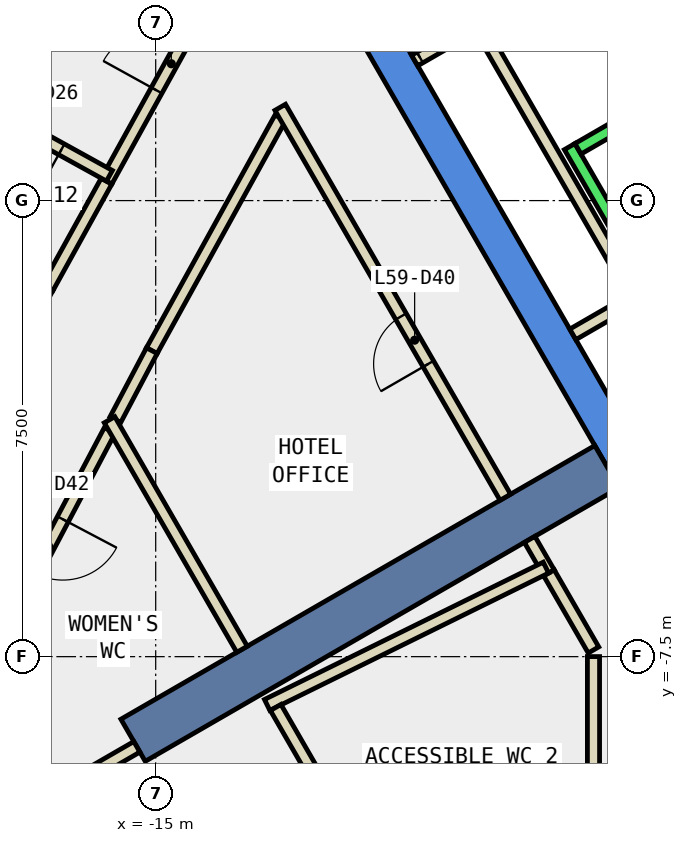
"""IFC4 building model, lengths in metres.
Left out: names, types, materials, properties, quantities, classifications, styles, units other than length and angle.
Written with IfcOpenShell. Run it as: python <this file> out.ifc"""

import sys

from ifc_helpers import new_model, si_unit, direction, frame, frame_2d, origin, place, context, subcontext, project, spatial, polyline, rectangle, outline, extrude, element, fill, save


model = new_model("IFC4")
c1 = context("Model", 3, precision=1e-05, world=origin(), true_north=direction((0.0, 1.0)))
c2 = subcontext(c1, "Body", "Model", "MODEL_VIEW")
j1 = project(units=[si_unit("LENGTHUNIT", "METRE"), si_unit("PLANEANGLEUNIT", "RADIAN")], contexts=[c1])
p1 = place(None, origin())
s1 = spatial("IfcSite", under=j1, at=p1, CompositionType="ELEMENT")
p2 = place(p1, origin())
s2 = spatial("IfcBuilding", under=s1, at=p2, CompositionType="ELEMENT")
p3 = place(p2, frame((0.0, 0.0, 259.4)))
s3 = spatial("IfcBuildingStorey", under=s2, at=p3, CompositionType="ELEMENT", Elevation=259.4)
p4 = place(p3, frame((0.0, 0.0, -0.34)))
e1 = element("IfcWall", 1, at=p4, inside=s3, PredefinedType="SHEAR", context=c2, shape_type="SweptSolid", body=[
    extrude(outline(polyline([(-11.547, 2.5), (-5.774, -7.5), (-5.427, -6.9), (-10.854, 2.5), (-11.547, 2.5)])), origin(), (0.0, 0.0, 1.0), 3.6),
])
p5 = place(p3, frame((-7.578, -4.375, -0.34), z_axis=(0.0, 0.0, 1.0), x_axis=(-0.866024315419, -0.5000018851, 0.0)))
e2 = element("IfcWall", 2, at=p5, inside=s3, PredefinedType="SHEAR", context=c2, shape_type="SweptSolid", body=[
    extrude(rectangle(XDim=9.0, YDim=0.8, at=frame_2d((4.5, 0.0))), origin(), (0.0, 0.0, 1.0), 3.6),
])
p6 = place(p3, frame((-8.532, -6.123, 0.0), z_axis=(0.0, 0.0, 1.0), x_axis=(-0.499977104415, 0.866038622153, 0.0)))
e3 = element("IfcWall", 3, at=p6, inside=s3, PredefinedType="PARTITIONING", context=c2, shape_type="SweptSolid", body=[
    extrude(rectangle(XDim=0.636, YDim=0.2, at=frame_2d((0.318, 0.0))), origin(), (0.0, 0.0, 1.0), 3.26),
])
p7 = place(p3, frame((-12.95, 1.36, 0.0), z_axis=(0.0, 0.0, 1.0), x_axis=(-0.483418231124, -0.875389521194, 0.0)))
e4 = element("IfcWall", 4, at=p7, inside=s3, PredefinedType="PARTITIONING", context=c2, shape_type="SweptSolid", body=[
    extrude(rectangle(XDim=4.373, YDim=0.2, at=frame_2d((2.187, 0.0))), origin(), (0.0, 0.0, 1.0), 3.26),
])
p8 = place(p3, frame((-15.064, -2.468, 0.0), z_axis=(0.0, 0.0, 1.0), x_axis=(-0.467126648849, -0.884190417238, 0.0)))
e5 = element("IfcWall", 5, at=p8, inside=s3, PredefinedType="PARTITIONING", context=c2, shape_type="SweptSolid", body=[
    extrude(rectangle(XDim=1.282, YDim=0.2, at=frame_2d((0.641, 0.0))), origin(), (0.0, 0.0, 1.0), 3.26),
])
p9 = place(p3, frame((-7.8, -7.39, 0.0), z_axis=(0.0, 0.0, 1.0), x_axis=(-0.500266477503, 0.865871498253, 0.0)))
e6 = element("IfcWall", 6, at=p9, inside=s3, PredefinedType="PARTITIONING", context=c2, shape_type="SweptSolid", body=[
    extrude(rectangle(XDim=1.463, YDim=0.2, at=frame_2d((0.731, 0.0))), origin(), (0.0, 0.0, 1.0), 3.26),
])
p10 = place(p3, frame((-15.756, -3.779, 0.0), z_axis=(0.0, 0.0, 1.0), x_axis=(-0.46672043873, -0.884404902786, 0.0)))
e7 = element("IfcWall", 7, at=p10, inside=s3, PredefinedType="PARTITIONING", context=c2, shape_type="SweptSolid", body=[
    extrude(rectangle(XDim=4.307, YDim=0.2, at=frame_2d((2.153, 0.0))), origin(), (0.0, 0.0, 1.0), 3.26),
])
p11 = place(p10, frame((1.653, 0.0, 0.0)))
e8 = element("IfcOpeningElement", 8, at=p11, cuts=e7, PredefinedType="OPENING", context=c2, shape_type="SweptSolid", body=[
    extrude(rectangle(XDim=1.0, YDim=2.1, at=frame_2d((0.5, 1.05))), frame((0.0, 0.11, 0.0), z_axis=(0.0, -1.0, 0.0), x_axis=(1.0, 0.0, 0.0)), (0.0, 0.0, 1.0), 0.22),
])
p12 = place(p3, frame((-15.809, 0.32, 0.0), z_axis=(0.0, 0.0, 1.0), x_axis=(0.483322920175, 0.875442148193, 0.0)))
e9 = element("IfcWall", 9, at=p12, inside=s3, PredefinedType="PARTITIONING", context=c2, shape_type="SweptSolid", body=[
    extrude(rectangle(XDim=4.31, YDim=0.2, at=frame_2d((2.155, 0.0))), origin(), (0.0, 0.0, 1.0), 3.26),
])
p13 = place(p12, frame((1.705, 0.0, 0.0)))
e10 = element("IfcOpeningElement", 10, at=p13, cuts=e9, PredefinedType="OPENING", context=c2, shape_type="SweptSolid", body=[
    extrude(rectangle(XDim=1.0, YDim=2.1, at=frame_2d((0.5, 1.05))), frame((0.0, 0.11, 0.0), z_axis=(0.0, -1.0, 0.0), x_axis=(1.0, 0.0, 0.0)), (0.0, 0.0, 1.0), 0.22),
])
p14 = place(p3, frame((-16.776, -1.43, 0.0), z_axis=(0.0, 0.0, 1.0), x_axis=(0.48360724937, 0.87528511261, 0.0)))
e11 = element("IfcWall", 11, at=p14, inside=s3, PredefinedType="PARTITIONING", context=c2, shape_type="SweptSolid", body=[
    extrude(rectangle(XDim=1.997, YDim=0.2, at=frame_2d((0.999, 0.0))), origin(), (0.0, 0.0, 1.0), 3.26),
])
p15 = place(p3, frame((-17.991, -3.729, 0.0), z_axis=(0.0, 0.0, 1.0), x_axis=(0.466450569784, 0.88454726609, 0.0)))
e12 = element("IfcWall", 12, at=p15, inside=s3, PredefinedType="PARTITIONING", context=c2, shape_type="SweptSolid", body=[
    extrude(rectangle(XDim=2.6, YDim=0.2, at=frame_2d((1.3, 0.0))), origin(), (0.0, 0.0, 1.0), 3.26),
])
p16 = place(p3, frame((-10.741, 2.303, 0.0), z_axis=(0.0, 0.0, 1.0), x_axis=(0.866063652425, 0.499933745558, 0.0)))
e13 = element("IfcWall", 13, at=p16, inside=s3, PredefinedType="PARTITIONING", context=c2, shape_type="SweptSolid", body=[
    extrude(rectangle(XDim=1.1, YDim=0.2, at=frame_2d((0.55, 0.0))), origin(), (0.0, 0.0, 1.0), 3.26),
])
p17 = place(p16, frame((0.1, 0.0, 0.0)))
e14 = element("IfcOpeningElement", 14, at=p17, cuts=e13, PredefinedType="OPENING", context=c2, shape_type="SweptSolid", body=[
    extrude(rectangle(XDim=0.9, YDim=2.1, at=frame_2d((0.45, 1.05))), frame((0.0, 0.11, 0.0), z_axis=(0.0, -1.0, 0.0), x_axis=(1.0, 0.0, 0.0)), (0.0, 0.0, 1.0), 0.22),
])
p18 = place(p3, frame((-9.751, 2.99, 0.0), z_axis=(0.0, 0.0, 1.0), x_axis=(0.499955951776, -0.866050833545, 0.0)))
e15 = element("IfcWall", 15, at=p18, inside=s3, PredefinedType="PARTITIONING", context=c2, shape_type="SweptSolid", body=[
    extrude(rectangle(XDim=5.4, YDim=0.2, at=frame_2d((2.7, 0.0))), origin(), (0.0, 0.0, 1.0), 3.26),
])
p19 = place(p3, frame((-7.188, -1.65, 0.0), z_axis=(0.0, 0.0, 1.0), x_axis=(-0.865841558281, -0.500318294642, 0.0)))
e16 = element("IfcWall", 16, at=p19, inside=s3, PredefinedType="PARTITIONING", context=c2, shape_type="SweptSolid", body=[
    extrude(rectangle(XDim=1.099, YDim=0.2, at=frame_2d((0.55, 0.0))), origin(), (0.0, 0.0, 1.0), 3.26),
])
p20 = place(p3, frame((-7.8, -12.184, 0.0), z_axis=(0.0, 0.0, 1.0), x_axis=(0.0, 1.0, 0.0)))
e17 = element("IfcWall", 17, at=p20, inside=s3, PredefinedType="PARTITIONING", context=c2, shape_type="SweptSolid", body=[
    extrude(rectangle(XDim=4.685, YDim=0.2, at=frame_2d((2.343, 0.0))), origin(), (0.0, 0.0, 1.0), 3.26),
])
p21 = place(p3, frame((-8.582, -6.036, 0.0), z_axis=(0.0, 0.0, 1.0), x_axis=(-0.897105141673, -0.441817116897, 0.0)))
e18 = element("IfcWall", 18, at=p21, inside=s3, PredefinedType="PARTITIONING", context=c2, shape_type="SweptSolid", body=[
    extrude(rectangle(XDim=5.111, YDim=0.2, at=frame_2d((2.555, 0.0))), origin(), (0.0, 0.0, 1.0), 3.26),
])
p22 = place(p3, frame((-13.58, -7.379, 0.0), z_axis=(0.0, 0.0, 1.0), x_axis=(-0.499916403993, 0.866073662582, 0.0)))
e19 = element("IfcWall", 19, at=p22, inside=s3, PredefinedType="PARTITIONING", context=c2, shape_type="SweptSolid", body=[
    extrude(rectangle(XDim=4.359, YDim=0.2, at=frame_2d((2.179, 0.0))), origin(), (0.0, 0.0, 1.0), 3.26),
])
p23 = place(p3, frame((-10.876, -12.062, 0.0), z_axis=(0.0, 0.0, 1.0), x_axis=(-0.499977877545, 0.866038175813, 0.0)))
e20 = element("IfcWall", 20, at=p23, inside=s3, PredefinedType="PARTITIONING", context=c2, shape_type="SweptSolid", body=[
    extrude(rectangle(XDim=4.302, YDim=0.2, at=frame_2d((2.151, 0.0))), origin(), (0.0, 0.0, 1.0), 3.26),
])
p24 = place(p3, frame((-15.31, -8.983, 0.0), z_axis=(0.0, 0.0, 1.0), x_axis=(-0.866047943894, -0.499960957353, 0.0)))
e21 = element("IfcWall", 21, at=p24, inside=s3, PredefinedType="PARTITIONING", context=c2, shape_type="SweptSolid", body=[
    extrude(rectangle(XDim=3.16, YDim=0.2, at=frame_2d((1.58, 0.0))), origin(), (0.0, 0.0, 1.0), 3.26),
])
p25 = place(p3, frame((-15.761, 0.408, 0.0), z_axis=(0.0, 0.0, 1.0), x_axis=(-0.875391622802, 0.483414425445, 0.0)))
e22 = element("IfcWall", 22, at=p25, inside=s3, PredefinedType="PARTITIONING", context=c2, shape_type="SweptSolid", body=[
    extrude(rectangle(XDim=2.699, YDim=0.2, at=frame_2d((1.35, 0.0))), origin(), (0.0, 0.0, 1.0), 3.26),
])
p26 = place(p25, frame((0.9, 0.0, 0.0)))
e23 = element("IfcOpeningElement", 23, at=p26, cuts=e22, PredefinedType="OPENING", context=c2, shape_type="SweptSolid", body=[
    extrude(rectangle(XDim=0.9, YDim=2.1, at=frame_2d((0.45, 1.05))), frame((0.0, 0.11, 0.0), z_axis=(0.0, -1.0, 0.0), x_axis=(1.0, 0.0, 0.0)), (0.0, 0.0, 1.0), 0.22),
])
p27 = place(p3, frame((-9.25, -4.879, 0.0), z_axis=(0.0, 0.0, 1.0), x_axis=(-0.499944124422, 0.866057661161, 0.0)))
e24 = element("IfcWall", 24, at=p27, inside=s3, PredefinedType="PARTITIONING", context=c2, shape_type="SweptSolid", body=[
    extrude(rectangle(XDim=7.405, YDim=0.2, at=frame_2d((3.702, 0.0))), origin(), (0.0, 0.0, 1.0), 3.26),
])
p28 = place(p27, frame((2.533, 0.0, 0.0)))
e25 = element("IfcOpeningElement", 25, at=p28, cuts=e24, PredefinedType="OPENING", context=c2, shape_type="SweptSolid", body=[
    extrude(rectangle(XDim=0.9, YDim=2.1, at=frame_2d((0.45, 1.05))), frame((0.0, 0.11, 0.0), z_axis=(0.0, -1.0, 0.0), x_axis=(1.0, 0.0, 0.0)), (0.0, 0.0, 1.0), 0.22),
])
p29 = place(p3, frame((-8.192, 0.888, 0.0), z_axis=(0.0, 0.0, 1.0), x_axis=(0.500034260056, -0.866005622828, 0.0)))
e26 = element("IfcWall", 26, at=p29, inside=s3, PredefinedType="STANDARD", context=c2, shape_type="SweptSolid", body=[
    extrude(rectangle(XDim=5.399, YDim=0.2, at=frame_2d((2.7, 0.0))), origin(), (0.0, 0.0, 1.0), 3.26),
])
p30 = place(p3, frame((-5.977, 2.052, 0.0), z_axis=(0.0, 0.0, 1.0), x_axis=(-0.865973769406, -0.500089422704, 0.0)))
e27 = element("IfcWall", 27, at=p30, inside=s3, PredefinedType="STANDARD", context=c2, shape_type="SweptSolid", body=[
    extrude(rectangle(XDim=2.399, YDim=0.2, at=frame_2d((1.2, 0.0))), origin(), (0.0, 0.0, 1.0), 3.26),
])
p31 = place(p3, frame((-6.25, 2.01, 0.0), z_axis=(0.0, 0.0, 1.0), x_axis=(-0.86611865017, 0.499838457731, 0.0)))
e28 = element("IfcWall", 28, at=p31, inside=s3, PredefinedType="STANDARD", context=c2, shape_type="SweptSolid", body=[
    extrude(rectangle(XDim=2.733, YDim=0.2, at=frame_2d((1.366, 0.0))), origin(), (0.0, 0.0, 1.0), 3.26),
])
p32 = place(p13, origin())
e29 = element("IfcDoor", 29, at=p32, inside=s3, OperationType="SINGLE_SWING_RIGHT", PredefinedType="DOOR", context=c2, shape_type="SweptSolid", body=[
    extrude(rectangle(XDim=1.0, YDim=2.1, at=frame_2d((0.5, 1.05))), frame((0.0, 0.025, 0.0), z_axis=(0.0, -1.0, 0.0), x_axis=(1.0, 0.0, 0.0)), (0.0, 0.0, 1.0), 0.05),
])
fill(e10, e29)
p33 = place(p26, origin())
e30 = element("IfcDoor", 30, at=p33, inside=s3, OperationType="SINGLE_SWING_LEFT", PredefinedType="DOOR", context=c2, shape_type="SweptSolid", body=[
    extrude(rectangle(XDim=0.9, YDim=2.1, at=frame_2d((0.45, 1.05))), frame((0.0, 0.025, 0.0), z_axis=(0.0, -1.0, 0.0), x_axis=(1.0, 0.0, 0.0)), (0.0, 0.0, 1.0), 0.05),
])
fill(e23, e30)
p34 = place(p28, origin())
e31 = element("IfcDoor", 31, at=p34, inside=s3, OperationType="SINGLE_SWING_RIGHT", PredefinedType="DOOR", context=c2, shape_type="SweptSolid", body=[
    extrude(rectangle(XDim=0.9, YDim=2.1, at=frame_2d((0.45, 1.05))), frame((0.0, 0.025, 0.0), z_axis=(0.0, -1.0, 0.0), x_axis=(1.0, 0.0, 0.0)), (0.0, 0.0, 1.0), 0.05),
])
fill(e25, e31)
p35 = place(p11, origin())
e32 = element("IfcDoor", 32, at=p35, inside=s3, OperationType="SINGLE_SWING_LEFT", PredefinedType="DOOR", context=c2, shape_type="SweptSolid", body=[
    extrude(rectangle(XDim=1.0, YDim=2.1, at=frame_2d((0.5, 1.05))), frame((0.0, 0.025, 0.0), z_axis=(0.0, -1.0, 0.0), x_axis=(1.0, 0.0, 0.0)), (0.0, 0.0, 1.0), 0.05),
])
fill(e8, e32)
p36 = place(p17, origin())
e33 = element("IfcDoor", 33, at=p36, inside=s3, OperationType="SINGLE_SWING_RIGHT", PredefinedType="DOOR", context=c2, shape_type="SweptSolid", body=[
    extrude(rectangle(XDim=0.9, YDim=2.1, at=frame_2d((0.45, 1.05))), frame((0.0, 0.025, 0.0), z_axis=(0.0, -1.0, 0.0), x_axis=(1.0, 0.0, 0.0)), (0.0, 0.0, 1.0), 0.05),
])
fill(e14, e33)
save(model, sys.argv[1])
